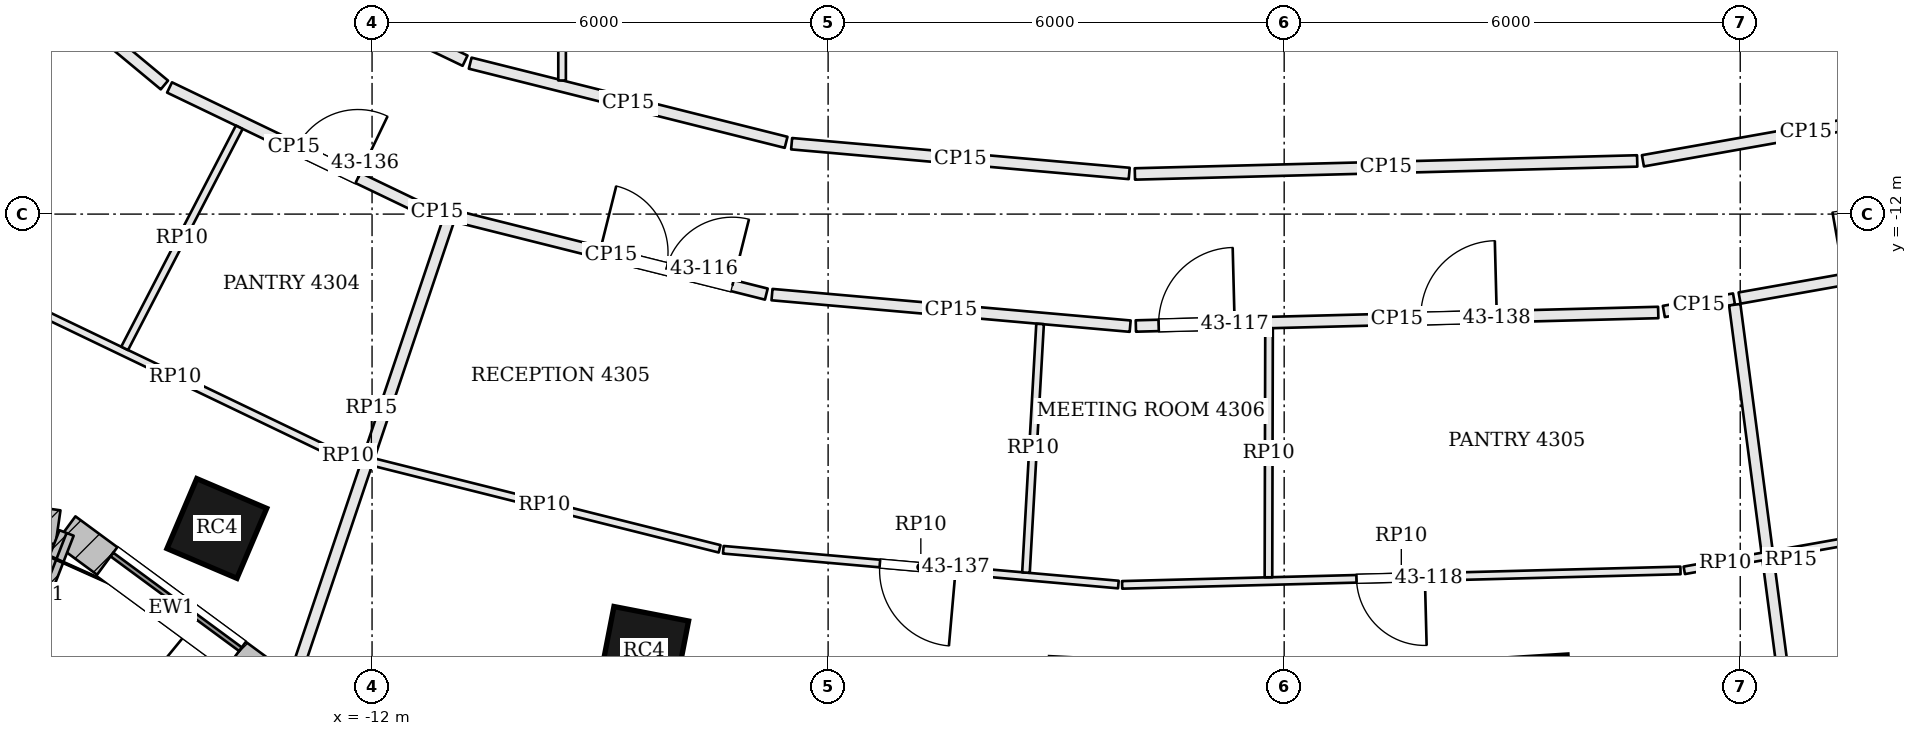
"""IFC4 building model, lengths in metres.
Left out: names, types, materials, properties, quantities, classifications, styles, units other than length and angle.
Written with IfcOpenShell. Run it as: python <this file> out.ifc"""

import sys

from ifc_helpers import new_model, si_unit, direction, frame, frame_2d, origin, origin_2d, place, context, subcontext, project, spatial, rectangle, extrude, element, fill, save


model = new_model("IFC4")
c1 = context("Model", 3, precision=1e-05, world=origin(), true_north=direction((0.0, 1.0)))
c2 = subcontext(c1, "Body", "Model", "MODEL_VIEW")
j1 = project(units=[si_unit("LENGTHUNIT", "METRE"), si_unit("PLANEANGLEUNIT", "RADIAN")], contexts=[c1])
p1 = place(None, origin())
s1 = spatial("IfcSite", under=j1, at=p1, CompositionType="ELEMENT")
p2 = place(p1, origin())
s2 = spatial("IfcBuilding", under=s1, at=p2, CompositionType="ELEMENT")
p3 = place(p2, frame((0.0, 0.0, 177.9)))
s3 = spatial("IfcBuildingStorey", under=s2, at=p3, CompositionType="ELEMENT", Elevation=177.9)
for number, where, z_axis, x_axis in (
    (1, (-14.042, -16.136, 0.0), (0.0, 0.0, 1.0), (0.92, -0.392, 0.0)),
    (2, (-8.422, -17.749, 0.0), (0.0, 0.0, 1.0), (0.982, -0.191, 0.0)),
    (3, (3.254, -18.33, 0.0), (0.0, 0.0, 1.0), (0.998, 0.063, 0.0)),
):
    element("IfcColumn", number, at=place(p3, frame(where, z_axis=z_axis, x_axis=x_axis)), inside=s3, PredefinedType="COLUMN", context=c2, shape_type="SweptSolid", body=[
        extrude(rectangle(XDim=1.0, YDim=1.0, at=origin_2d()), origin(), (0.0, 0.0, 1.0), 3.9),
    ])
p4 = place(p3, frame((-21.825, -15.297, 0.0), z_axis=(0.0, 0.0, 1.0), x_axis=(0.98971474215, -0.143054986527, 0.0)))
e4 = element("IfcWall", 4, at=p4, inside=s3, PredefinedType="SOLIDWALL", context=c2, shape_type="SweptSolid", body=[
    extrude(rectangle(XDim=5.753, YDim=0.45, at=frame_2d((2.876, 0.0))), origin(), (0.0, 0.0, 1.0), 3.7),
])
p5 = place(p4, frame((1.826, 0.0, 0.9)))
e5 = element("IfcOpeningElement", 5, at=p5, cuts=e4, PredefinedType="OPENING", context=c2, shape_type="SweptSolid", body=[
    extrude(rectangle(XDim=2.1, YDim=2.3, at=frame_2d((1.05, 1.15))), frame((0.0, 0.235, 0.0), z_axis=(0.0, -1.0, 0.0), x_axis=(1.0, 0.0, 0.0)), (0.0, 0.0, 1.0), 0.47),
])
p6 = place(p3, frame((-16.036, -16.158, 0.0), z_axis=(0.0, 0.0, 1.0), x_axis=(0.805181432967, -0.593028549064, 0.0)))
e6 = element("IfcWall", 6, at=p6, inside=s3, PredefinedType="SOLIDWALL", context=c2, shape_type="SweptSolid", body=[
    extrude(rectangle(XDim=3.469, YDim=0.45, at=frame_2d((1.734, 0.0))), origin(), (0.0, 0.0, 1.0), 3.7),
])
p7 = place(p6, frame((0.684, 0.0, 0.9)))
e7 = element("IfcOpeningElement", 7, at=p7, cuts=e6, PredefinedType="OPENING", context=c2, shape_type="SweptSolid", body=[
    extrude(rectangle(XDim=2.1, YDim=2.3, at=frame_2d((1.05, 1.15))), frame((0.0, 0.235, 0.0), z_axis=(0.0, -1.0, 0.0), x_axis=(1.0, 0.0, 0.0)), (0.0, 0.0, 1.0), 0.47),
])
p8 = place(p3, frame((-16.019, -16.195, 0.0), z_axis=(0.0, 0.0, 1.0), x_axis=(-0.362641522028, -0.931928713208, 0.0)))
e8 = element("IfcWall", 8, at=p8, inside=s3, PredefinedType="SOLIDWALL", context=c2, shape_type="SweptSolid", body=[
    extrude(rectangle(XDim=1.75, YDim=0.2, at=frame_2d((0.875, 0.0))), origin(), (0.0, 0.0, 1.0), 3.7),
])
p9 = place(p3, frame((-17.297, -8.171, 0.0), z_axis=(0.0, 0.0, 1.0), x_axis=(0.769228575061, -0.638973707839, 0.0)))
e9 = element("IfcWall", 9, at=p9, inside=s3, PredefinedType="PARTITIONING", context=c2, shape_type="SweptSolid", body=[
    extrude(rectangle(XDim=3.334, YDim=0.15, at=frame_2d((1.667, 0.0))), origin(), (0.0, 0.0, 1.0), 3.084),
])
p10 = place(p9, frame((1.234, 0.0, 0.0)))
e10 = element("IfcOpeningElement", 10, at=p10, cuts=e9, PredefinedType="OPENING", context=c2, shape_type="SweptSolid", body=[
    extrude(rectangle(XDim=1.0, YDim=2.4, at=frame_2d((0.5, 1.2))), frame((0.0, 0.085, 0.0), z_axis=(0.0, -1.0, 0.0), x_axis=(1.0, 0.0, 0.0)), (0.0, 0.0, 1.0), 0.17),
])
p11 = place(p3, frame((-14.664, -10.334, 0.0), z_axis=(0.0, 0.0, 1.0), x_axis=(0.901507315282, -0.432763862278, 0.0)))
e11 = element("IfcWall", 11, at=p11, inside=s3, PredefinedType="PARTITIONING", context=c2, shape_type="SweptSolid", body=[
    extrude(rectangle(XDim=3.63, YDim=0.15, at=frame_2d((1.815, 0.0))), origin(), (0.0, 0.0, 1.0), 3.084),
])
p12 = place(p11, frame((1.85, 0.0, 0.0)))
e12 = element("IfcOpeningElement", 12, at=p12, cuts=e11, PredefinedType="OPENING", context=c2, shape_type="SweptSolid", body=[
    extrude(rectangle(XDim=0.9, YDim=2.1, at=frame_2d((0.45, 1.05))), frame((0.0, 0.085, 0.0), z_axis=(0.0, -1.0, 0.0), x_axis=(1.0, 0.0, 0.0)), (0.0, 0.0, 1.0), 0.17),
])
p13 = place(p3, frame((-11.319, -11.923, 0.0), z_axis=(0.0, 0.0, 1.0), x_axis=(0.969942256681, -0.243335198242, 0.0)))
e13 = element("IfcWall", 13, at=p13, inside=s3, PredefinedType="PARTITIONING", context=c2, shape_type="SweptSolid", body=[
    extrude(rectangle(XDim=0.359, YDim=0.15, at=frame_2d((0.18, 0.0))), origin(), (0.0, 0.0, 1.0), 3.084),
])
p14 = place(p3, frame((-13.024, -18.112, 0.0), z_axis=(0.0, 0.0, 1.0), x_axis=(0.319081027508, 0.947727438605, 0.0)))
e14 = element("IfcWall", 14, at=p14, inside=s3, PredefinedType="PARTITIONING", context=c2, shape_type="SweptSolid", body=[
    extrude(rectangle(XDim=6.363, YDim=0.15, at=frame_2d((3.181, 0.0))), origin(), (0.0, 0.0, 1.0), 3.234),
])
p15 = place(p3, frame((-10.897, -12.029, 0.0), z_axis=(0.0, 0.0, 1.0), x_axis=(0.969999087169, -0.24310855783, 0.0)))
e15 = element("IfcWall", 15, at=p15, inside=s3, PredefinedType="PARTITIONING", context=c2, shape_type="SweptSolid", body=[
    extrude(rectangle(XDim=4.211, YDim=0.15, at=frame_2d((2.105, 0.0))), origin(), (0.0, 0.0, 1.0), 3.084),
])
p16 = place(p15, frame((1.95, 0.0, 0.0)))
e16 = element("IfcOpeningElement", 16, at=p16, cuts=e15, PredefinedType="OPENING", context=c2, shape_type="SweptSolid", body=[
    extrude(rectangle(XDim=1.8, YDim=2.1, at=frame_2d((0.9, 1.05))), frame((0.0, 0.085, 0.0), z_axis=(0.0, -1.0, 0.0), x_axis=(1.0, 0.0, 0.0)), (0.0, 0.0, 1.0), 0.17),
])
p17 = place(p3, frame((-6.738, -13.059, 0.0), z_axis=(0.0, 0.0, 1.0), x_axis=(0.996143527037, -0.087738666181, 0.0)))
e17 = element("IfcWall", 17, at=p17, inside=s3, PredefinedType="PARTITIONING", context=c2, shape_type="SweptSolid", body=[
    extrude(rectangle(XDim=4.73, YDim=0.15, at=frame_2d((2.365, 0.0))), origin(), (0.0, 0.0, 1.0), 3.084),
])
p18 = place(p3, frame((-1.951, -13.472, 0.0), z_axis=(0.0, 0.0, 1.0), x_axis=(0.999663898238, 0.025924709429, 0.0)))
e18 = element("IfcWall", 18, at=p18, inside=s3, PredefinedType="PARTITIONING", context=c2, shape_type="SweptSolid", body=[
    extrude(rectangle(XDim=6.875, YDim=0.15, at=frame_2d((3.437, 0.0))), origin(), (0.0, 0.0, 1.0), 3.084),
])
p19 = place(p18, frame((0.3, 0.0, 0.0)))
e19 = element("IfcOpeningElement", 19, at=p19, cuts=e18, PredefinedType="OPENING", context=c2, shape_type="SweptSolid", body=[
    extrude(rectangle(XDim=1.0, YDim=2.4, at=frame_2d((0.5, 1.2))), frame((0.0, 0.085, 0.0), z_axis=(0.0, -1.0, 0.0), x_axis=(1.0, 0.0, 0.0)), (0.0, 0.0, 1.0), 0.17),
])
p20 = place(p18, frame((3.75, 0.0, 0.0)))
e20 = element("IfcOpeningElement", 20, at=p20, cuts=e18, PredefinedType="OPENING", context=c2, shape_type="SweptSolid", body=[
    extrude(rectangle(XDim=1.0, YDim=2.1, at=frame_2d((0.5, 1.05))), frame((0.0, 0.085, 0.0), z_axis=(0.0, -1.0, 0.0), x_axis=(1.0, 0.0, 0.0)), (0.0, 0.0, 1.0), 0.17),
])
p21 = place(p3, frame((4.995, -13.281, 0.0), z_axis=(0.0, 0.0, 1.0), x_axis=(0.984615318048, 0.174736016506, 0.0)))
e21 = element("IfcWall", 21, at=p21, inside=s3, PredefinedType="PARTITIONING", context=c2, shape_type="SweptSolid", body=[
    extrude(rectangle(XDim=0.938, YDim=0.15, at=frame_2d((0.469, 0.0))), origin(), (0.0, 0.0, 1.0), 3.084),
])
p22 = place(p3, frame((6.807, -19.901, 0.0), z_axis=(0.0, 0.0, 1.0), x_axis=(-0.129934596003, 0.991522566945, 0.0)))
e22 = element("IfcWall", 22, at=p22, inside=s3, PredefinedType="PARTITIONING", context=c2, shape_type="SweptSolid", body=[
    extrude(rectangle(XDim=6.766, YDim=0.15, at=frame_2d((3.383, 0.0))), origin(), (0.0, 0.0, 1.0), 3.234),
])
p23 = place(p3, frame((5.992, -13.104, 0.0), z_axis=(0.0, 0.0, 1.0), x_axis=(0.98463249319, 0.174639209096, 0.0)))
e23 = element("IfcWall", 23, at=p23, inside=s3, PredefinedType="PARTITIONING", context=c2, shape_type="SweptSolid", body=[
    extrude(rectangle(XDim=3.67, YDim=0.15, at=frame_2d((1.835, 0.0))), origin(), (0.0, 0.0, 1.0), 3.084),
])
p24 = place(p23, frame((1.4, 0.0, 0.0)))
e24 = element("IfcOpeningElement", 24, at=p24, cuts=e23, PredefinedType="OPENING", context=c2, shape_type="SweptSolid", body=[
    extrude(rectangle(XDim=1.8, YDim=2.1, at=frame_2d((0.9, 1.05))), frame((0.0, 0.085, 0.0), z_axis=(0.0, -1.0, 0.0), x_axis=(1.0, 0.0, 0.0)), (0.0, 0.0, 1.0), 0.17),
])
p25 = place(p3, frame((9.01, -10.538, 0.0), z_axis=(0.0, 0.0, 1.0), x_axis=(-0.984645638575, -0.174565077936, 0.0)))
e25 = element("IfcWall", 25, at=p25, inside=s3, PredefinedType="PARTITIONING", context=c2, shape_type="SweptSolid", body=[
    extrude(rectangle(XDim=4.358, YDim=0.15, at=frame_2d((2.179, 0.0))), origin(), (0.0, 0.0, 1.0), 3.084),
])
p26 = place(p3, frame((4.645, -11.301, 0.0), z_axis=(0.0, 0.0, 1.0), x_axis=(-0.9996648469, -0.02588810291, 0.0)))
e26 = element("IfcWall", 26, at=p26, inside=s3, PredefinedType="PARTITIONING", context=c2, shape_type="SweptSolid", body=[
    extrude(rectangle(XDim=6.611, YDim=0.15, at=frame_2d((3.305, 0.0))), origin(), (0.0, 0.0, 1.0), 3.084),
])
p27 = place(p3, frame((-2.039, -11.465, 0.0), z_axis=(0.0, 0.0, 1.0), x_axis=(-0.996139855484, 0.087780341286, 0.0)))
e27 = element("IfcWall", 27, at=p27, inside=s3, PredefinedType="PARTITIONING", context=c2, shape_type="SweptSolid", body=[
    extrude(rectangle(XDim=4.458, YDim=0.15, at=frame_2d((2.229, 0.0))), origin(), (0.0, 0.0, 1.0), 3.084),
])
p28 = place(p3, frame((-6.553, -11.056, 0.0), z_axis=(0.0, 0.0, 1.0), x_axis=(-0.970004917182, 0.243085294995, 0.0)))
e28 = element("IfcWall", 28, at=p28, inside=s3, PredefinedType="PARTITIONING", context=c2, shape_type="SweptSolid", body=[
    extrude(rectangle(XDim=4.284, YDim=0.15, at=frame_2d((2.142, 0.0))), origin(), (0.0, 0.0, 1.0), 3.084),
])
p29 = place(p3, frame((-10.776, -9.982, 0.0), z_axis=(0.0, 0.0, 1.0), x_axis=(-0.901511079436, 0.432756020933, 0.0)))
e29 = element("IfcWall", 29, at=p29, inside=s3, PredefinedType="PARTITIONING", context=c2, shape_type="SweptSolid", body=[
    extrude(rectangle(XDim=3.181, YDim=0.15, at=frame_2d((1.59, 0.0))), origin(), (0.0, 0.0, 1.0), 3.084),
])
p30 = place(p3, frame((-12.078, -15.238, 0.0), z_axis=(0.0, 0.0, 1.0), x_axis=(-0.970024978464, 0.243005228658, 0.0)))
e30 = element("IfcWall", 30, at=p30, inside=s3, PredefinedType="PARTITIONING", context=c2, shape_type="SweptSolid", body=[
    extrude(rectangle(XDim=0.489, YDim=0.1, at=frame_2d((0.245, 0.0))), origin(), (0.0, 0.0, 1.0), 3.084),
])
p31 = place(p3, frame((-12.597, -15.098, 0.0), z_axis=(0.0, 0.0, 1.0), x_axis=(-0.901514437286, 0.432749025839, 0.0)))
e31 = element("IfcWall", 31, at=p31, inside=s3, PredefinedType="PARTITIONING", context=c2, shape_type="SweptSolid", body=[
    extrude(rectangle(XDim=4.42, YDim=0.1, at=frame_2d((2.21, 0.0))), origin(), (0.0, 0.0, 1.0), 3.084),
])
p32 = place(p3, frame((-13.747, -10.857, 0.0), z_axis=(0.0, 0.0, 1.0), x_axis=(-0.460160569956, -0.887835711074, 0.0)))
e32 = element("IfcWall", 32, at=p32, inside=s3, PredefinedType="PARTITIONING", context=c2, shape_type="SweptSolid", body=[
    extrude(rectangle(XDim=3.277, YDim=0.1, at=frame_2d((1.638, 0.0))), origin(), (0.0, 0.0, 1.0), 3.084),
])
p33 = place(p3, frame((6.34, -16.496, 0.0), z_axis=(0.0, 0.0, 1.0), x_axis=(-0.984632558058, -0.174638843366, 0.0)))
e33 = element("IfcWall", 33, at=p33, inside=s3, PredefinedType="PARTITIONING", context=c2, shape_type="SweptSolid", body=[
    extrude(rectangle(XDim=1.093, YDim=0.1, at=frame_2d((0.547, 0.0))), origin(), (0.0, 0.0, 1.0), 3.084),
])
p34 = place(p3, frame((5.214, -16.688, 0.0), z_axis=(0.0, 0.0, 1.0), x_axis=(-0.999664981446, -0.025882906921, 0.0)))
e34 = element("IfcWall", 34, at=p34, inside=s3, PredefinedType="PARTITIONING", context=c2, shape_type="SweptSolid", body=[
    extrude(rectangle(XDim=7.348, YDim=0.1, at=frame_2d((3.674, 0.0))), origin(), (0.0, 0.0, 1.0), 3.084),
])
p35 = place(p34, frame((3.364, 0.0, 0.0)))
e35 = element("IfcOpeningElement", 35, at=p35, cuts=e34, PredefinedType="OPENING", context=c2, shape_type="SweptSolid", body=[
    extrude(rectangle(XDim=0.9, YDim=2.1, at=frame_2d((0.45, 1.05))), frame((0.0, 0.06, 0.0), z_axis=(0.0, -1.0, 0.0), x_axis=(1.0, 0.0, 0.0)), (0.0, 0.0, 1.0), 0.12),
])
p36 = place(p3, frame((-2.181, -16.874, 0.0), z_axis=(0.0, 0.0, 1.0), x_axis=(-0.996143934904, 0.087734035321, 0.0)))
e36 = element("IfcWall", 36, at=p36, inside=s3, PredefinedType="PARTITIONING", context=c2, shape_type="SweptSolid", body=[
    extrude(rectangle(XDim=5.218, YDim=0.1, at=frame_2d((2.609, 0.0))), origin(), (0.0, 0.0, 1.0), 3.084),
])
p37 = place(p36, frame((2.15, 0.0, 0.0)))
e37 = element("IfcOpeningElement", 37, at=p37, cuts=e36, PredefinedType="OPENING", context=c2, shape_type="SweptSolid", body=[
    extrude(rectangle(XDim=1.0, YDim=2.1, at=frame_2d((0.5, 1.05))), frame((0.0, 0.06, 0.0), z_axis=(0.0, -1.0, 0.0), x_axis=(1.0, 0.0, 0.0)), (0.0, 0.0, 1.0), 0.12),
])
p38 = place(p3, frame((-7.427, -16.404, 0.0), z_axis=(0.0, 0.0, 1.0), x_axis=(-0.970009433409, 0.243067272783, 0.0)))
e38 = element("IfcWall", 38, at=p38, inside=s3, PredefinedType="PARTITIONING", context=c2, shape_type="SweptSolid", body=[
    extrude(rectangle(XDim=4.754, YDim=0.1, at=frame_2d((2.377, 0.0))), origin(), (0.0, 0.0, 1.0), 3.084),
])
p39 = place(p3, frame((-3.211, -13.445, 0.0), z_axis=(0.0, 0.0, 1.0), x_axis=(-0.056703901856, -0.99839103938, 0.0)))
e39 = element("IfcWall", 39, at=p39, inside=s3, PredefinedType="PARTITIONING", context=c2, shape_type="SweptSolid", body=[
    extrude(rectangle(XDim=3.277, YDim=0.1, at=frame_2d((1.638, 0.0))), origin(), (0.0, 0.0, 1.0), 3.084),
])
p40 = place(p3, frame((-0.199, -13.502, 0.0), z_axis=(0.0, 0.0, 1.0), x_axis=(-0.002309978934, -0.999997331995, 0.0)))
e40 = element("IfcWall", 40, at=p40, inside=s3, PredefinedType="PARTITIONING", context=c2, shape_type="SweptSolid", body=[
    extrude(rectangle(XDim=3.276, YDim=0.1, at=frame_2d((1.638, 0.0))), origin(), (0.0, 0.0, 1.0), 3.084),
])
p41 = place(p3, frame((10.441, -15.769, 0.0), z_axis=(0.0, 0.0, 1.0), x_axis=(-0.984637220861, -0.174612551941, 0.0)))
e41 = element("IfcWall", 41, at=p41, inside=s3, PredefinedType="PARTITIONING", context=c2, shape_type="SweptSolid", body=[
    extrude(rectangle(XDim=4.125, YDim=0.1, at=frame_2d((2.062, 0.0))), origin(), (0.0, 0.0, 1.0), 3.084),
])
p42 = place(p3, frame((-9.5, -10.242, 0.0), z_axis=(0.0, 0.0, 1.0), x_axis=(0.0, 1.0, 0.0)))
e42 = element("IfcWall", 42, at=p42, inside=s3, PredefinedType="PARTITIONING", context=c2, shape_type="SweptSolid", body=[
    extrude(rectangle(XDim=5.167, YDim=0.1, at=frame_2d((2.583, 0.0))), origin(), (0.0, 0.0, 1.0), 3.084),
])
p43 = place(p7, origin())
e43 = element("IfcWindow", 43, at=p43, inside=s3, PartitioningType="SINGLE_PANEL", PredefinedType="WINDOW", context=c2, shape_type="SweptSolid", body=[
    extrude(rectangle(XDim=2.1, YDim=2.3, at=frame_2d((1.05, 1.15))), frame((0.0, 0.135, 0.0), z_axis=(0.0, -1.0, 0.0), x_axis=(1.0, 0.0, 0.0)), (0.0, 0.0, 1.0), 0.06),
])
fill(e7, e43)
p44 = place(p16, origin())
e44 = element("IfcDoor", 44, at=p44, inside=s3, OperationType="DOUBLE_DOOR_SINGLE_SWING", PredefinedType="DOOR", context=c2, shape_type="SweptSolid", body=[
    extrude(rectangle(XDim=1.8, YDim=2.1, at=frame_2d((0.9, 1.05))), frame((0.0, 0.025, 0.0), z_axis=(0.0, -1.0, 0.0), x_axis=(1.0, 0.0, 0.0)), (0.0, 0.0, 1.0), 0.05),
])
fill(e16, e44)
p45 = place(p19, origin())
e45 = element("IfcDoor", 45, at=p45, inside=s3, OperationType="SINGLE_SWING_RIGHT", PredefinedType="DOOR", context=c2, shape_type="SweptSolid", body=[
    extrude(rectangle(XDim=1.0, YDim=2.4, at=frame_2d((0.5, 1.2))), frame((0.0, 0.025, 0.0), z_axis=(0.0, -1.0, 0.0), x_axis=(1.0, 0.0, 0.0)), (0.0, 0.0, 1.0), 0.05),
])
fill(e19, e45)
p46 = place(p35, origin())
e46 = element("IfcDoor", 46, at=p46, inside=s3, OperationType="SINGLE_SWING_LEFT", PredefinedType="DOOR", context=c2, shape_type="SweptSolid", body=[
    extrude(rectangle(XDim=0.9, YDim=2.1, at=frame_2d((0.45, 1.05))), frame((0.0, 0.025, 0.0), z_axis=(0.0, -1.0, 0.0), x_axis=(1.0, 0.0, 0.0)), (0.0, 0.0, 1.0), 0.05),
])
fill(e35, e46)
p47 = place(p12, origin())
e47 = element("IfcDoor", 47, at=p47, inside=s3, OperationType="SINGLE_SWING_RIGHT", PredefinedType="DOOR", context=c2, shape_type="SweptSolid", body=[
    extrude(rectangle(XDim=0.9, YDim=2.1, at=frame_2d((0.45, 1.05))), frame((0.0, 0.025, 0.0), z_axis=(0.0, -1.0, 0.0), x_axis=(1.0, 0.0, 0.0)), (0.0, 0.0, 1.0), 0.05),
])
fill(e12, e47)
p48 = place(p37, origin())
e48 = element("IfcDoor", 48, at=p48, inside=s3, OperationType="SINGLE_SWING_LEFT", PredefinedType="DOOR", context=c2, shape_type="SweptSolid", body=[
    extrude(rectangle(XDim=1.0, YDim=2.1, at=frame_2d((0.5, 1.05))), frame((0.0, 0.025, 0.0), z_axis=(0.0, -1.0, 0.0), x_axis=(1.0, 0.0, 0.0)), (0.0, 0.0, 1.0), 0.05),
])
fill(e37, e48)
p49 = place(p20, origin())
e49 = element("IfcDoor", 49, at=p49, inside=s3, OperationType="SINGLE_SWING_RIGHT", PredefinedType="DOOR", context=c2, shape_type="SweptSolid", body=[
    extrude(rectangle(XDim=1.0, YDim=2.1, at=frame_2d((0.5, 1.05))), frame((0.0, 0.025, 0.0), z_axis=(0.0, -1.0, 0.0), x_axis=(1.0, 0.0, 0.0)), (0.0, 0.0, 1.0), 0.05),
])
fill(e20, e49)
save(model, sys.argv[1])
